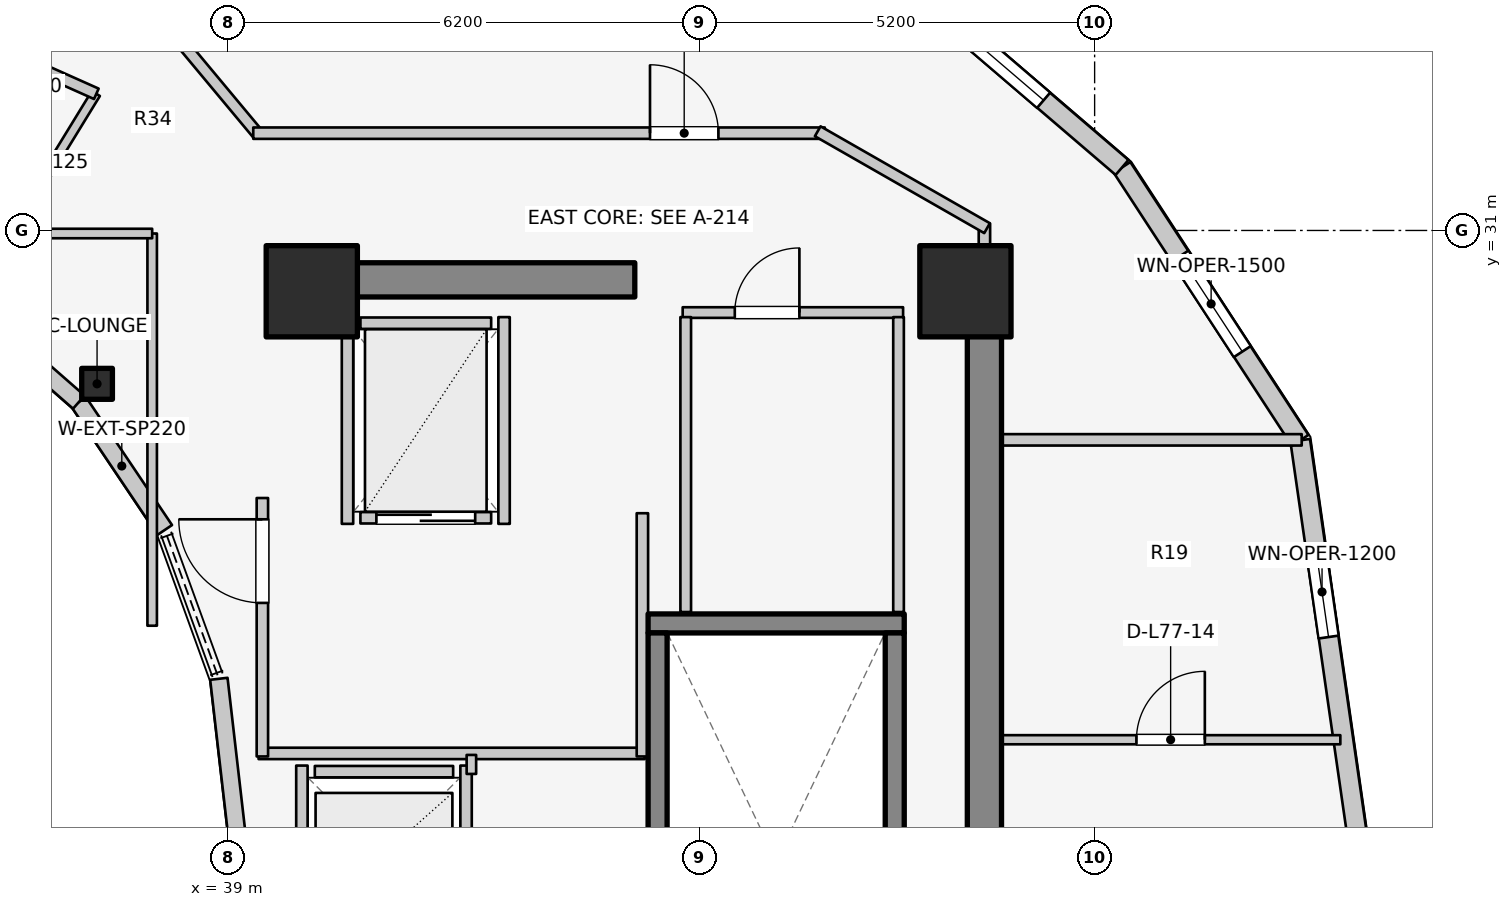
"""IFC4 building model, lengths in metres.
Left out: names, types, materials, properties, quantities, classifications, styles, units other than length and angle.
Written with IfcOpenShell. Run it as: python <this file> out.ifc"""

import sys

from ifc_helpers import new_model, si_unit, direction, frame, frame_2d, origin, origin_2d, place, context, subcontext, project, spatial, rectangle, i_section, extrude, element, fill, save


model = new_model("IFC4")
c1 = context("Model", 3, precision=1e-05, world=origin(), true_north=direction((0.0, 1.0)))
c2 = subcontext(c1, "Body", "Model", "MODEL_VIEW")
j1 = project(units=[si_unit("LENGTHUNIT", "METRE"), si_unit("PLANEANGLEUNIT", "RADIAN")], contexts=[c1])
p1 = place(None, origin())
s1 = spatial("IfcSite", under=j1, at=p1, CompositionType="ELEMENT")
p2 = place(p1, origin())
s2 = spatial("IfcBuilding", under=s1, at=p2, CompositionType="ELEMENT")
p3 = place(p2, frame((0.0, 0.0, 253.2)))
s3 = spatial("IfcBuildingStorey", under=s2, at=p3, CompositionType="ELEMENT", Elevation=253.2)
p4 = place(p3, frame((48.95, 17.05, 0.0), z_axis=(0.0, 0.0, 1.0), x_axis=(0.0, 1.0, 0.0)))
e1 = element("IfcWall", 1, at=p4, inside=s3, PredefinedType="SHEAR", context=c2, shape_type="SweptSolid", body=[
    extrude(rectangle(XDim=12.8, YDim=0.45, at=frame_2d((6.4, 0.0))), origin(), (0.0, 0.0, 1.0), 3.6),
])
p5 = place(p3, frame((39.85, 30.35, 0.0), z_axis=(0.0, 0.0, 1.0), x_axis=(1.0, 0.0, 0.0)))
e2 = element("IfcWall", 2, at=p5, inside=s3, PredefinedType="SHEAR", context=c2, shape_type="SweptSolid", body=[
    extrude(rectangle(XDim=4.5, YDim=0.45, at=frame_2d((2.25, 0.0))), origin(), (0.0, 0.0, 1.0), 3.6),
])
p6 = place(p3, frame((44.525, 25.83, 0.0), z_axis=(0.0, 0.0, 1.0), x_axis=(1.0, 0.0, 0.0)))
e3 = element("IfcWall", 3, at=p6, inside=s3, PredefinedType="SOLIDWALL", context=c2, shape_type="SweptSolid", body=[
    extrude(rectangle(XDim=3.37, YDim=0.25, at=frame_2d((1.685, 0.0))), origin(), (0.0, 0.0, 1.0), 3.6),
])
for number, where, z_axis, x_axis in (
    (4, (44.65, 17.895, 0.0), (0.0, 0.0, 1.0), (0.0, 1.0, 0.0)),
    (5, (47.77, 17.895, 0.0), (0.0, 0.0, 1.0), (0.0, 1.0, 0.0)),
):
    element("IfcWall", number, at=place(p3, frame(where, z_axis=z_axis, x_axis=x_axis)), inside=s3, PredefinedType="SOLIDWALL", context=c2, shape_type="SweptSolid", body=[
        extrude(rectangle(XDim=7.81, YDim=0.25, at=frame_2d((3.905, 0.0))), origin(), (0.0, 0.0, 1.0), 3.6),
    ])
for number, where, z_axis, x_axis in (
    (6, (48.7, 30.2, 0.0), (0.0, 0.0, 1.0), (1.0, 0.0, 0.0)),
    (7, (40.1, 30.2, 0.0), (0.0, 0.0, 1.0), (1.0, 0.0, 0.0)),
):
    element("IfcColumn", number, at=place(p3, frame(where, z_axis=z_axis, x_axis=x_axis)), inside=s3, PredefinedType="COLUMN", context=c2, shape_type="SweptSolid", body=[
        extrude(rectangle(XDim=1.2, YDim=1.2, at=origin_2d()), origin(), (0.0, 0.0, 1.0), 3.6),
    ])
p7 = place(p3, frame((37.275, 28.982, 0.0), z_axis=(0.0, 0.0, 1.0), x_axis=(1.0, 0.0, 0.0)))
e8 = element("IfcColumn", 8, at=p7, inside=s3, PredefinedType="COLUMN", context=c2, shape_type="SweptSolid", body=[
    extrude(i_section(OverallWidth=0.404, OverallDepth=0.407, WebThickness=0.027, FlangeThickness=0.044, FilletRadius=0.025, at=origin_2d()), origin(), (0.0, 0.0, 1.0), 3.6),
])
p8 = place(p3, frame((39.12, 23.0, 0.0), z_axis=(0.0, 0.0, 1.0), x_axis=(-0.114711713601, 0.993398823617, 0.0)))
e9 = element("IfcWall", 9, at=p8, inside=s3, PredefinedType="STANDARD", context=c2, shape_type="SweptSolid", body=[
    extrude(rectangle(XDim=2.115, YDim=0.23, at=frame_2d((1.058, 0.0))), origin(), (0.0, 0.0, 1.0), 3.28),
])
p9 = place(p3, frame((38.166, 27.06, 0.0), z_axis=(0.0, 0.0, 1.0), x_axis=(-0.558197800898, 0.829707909492, 0.0)))
e10 = element("IfcWall", 10, at=p9, inside=s3, PredefinedType="STANDARD", context=c2, shape_type="SweptSolid", body=[
    extrude(rectangle(XDim=2.027, YDim=0.23, at=frame_2d((1.013, 0.0))), origin(), (0.0, 0.0, 1.0), 2.6),
])
p10 = place(p3, frame((37.035, 28.742, 0.0), z_axis=(0.0, 0.0, 1.0), x_axis=(-0.752576694707, 0.658504607869, 0.0)))
e11 = element("IfcWall", 11, at=p10, inside=s3, PredefinedType="STANDARD", context=c2, shape_type="SweptSolid", body=[
    extrude(rectangle(XDim=1.959, YDim=0.23, at=frame_2d((0.98, 0.0))), origin(), (0.0, 0.0, 1.0), 2.6),
])
p11 = place(p3, frame((53.86, 23.0, 0.0), z_axis=(0.0, 0.0, 1.0), x_axis=(-0.142712754019, 0.989764148593, 0.0)))
e12 = element("IfcWall", 12, at=p11, inside=s3, PredefinedType="STANDARD", context=c2, shape_type="SweptSolid", body=[
    extrude(rectangle(XDim=5.293, YDim=0.26, at=frame_2d((2.646, 0.0))), origin(), (0.0, 0.0, 1.0), 3.29),
])
p12 = place(p11, frame((2.678, 0.0, 0.75)))
e13 = element("IfcOpeningElement", 13, at=p12, cuts=e12, PredefinedType="OPENING", context=c2, shape_type="SweptSolid", body=[
    extrude(rectangle(XDim=1.2, YDim=1.5, at=frame_2d((0.6, 0.75))), frame((0.0, 0.14, 0.0), z_axis=(0.0, -1.0, 0.0), x_axis=(1.0, 0.0, 0.0)), (0.0, 0.0, 1.0), 0.28),
])
p13 = place(p3, frame((53.105, 28.239, 0.0), z_axis=(0.0, 0.0, 1.0), x_axis=(-0.546606419826, 0.837389647539, 0.0)))
e14 = element("IfcWall", 14, at=p13, inside=s3, PredefinedType="STANDARD", context=c2, shape_type="SweptSolid", body=[
    extrude(rectangle(XDim=4.288, YDim=0.26, at=frame_2d((2.144, 0.0))), origin(), (0.0, 0.0, 1.0), 3.29),
])
p14 = place(p13, frame((1.394, 0.0, 0.75)))
e15 = element("IfcOpeningElement", 15, at=p14, cuts=e14, PredefinedType="OPENING", context=c2, shape_type="SweptSolid", body=[
    extrude(rectangle(XDim=1.5, YDim=1.6, at=frame_2d((0.75, 0.8))), frame((0.0, 0.14, 0.0), z_axis=(0.0, -1.0, 0.0), x_axis=(1.0, 0.0, 0.0)), (0.0, 0.0, 1.0), 0.28),
])
p15 = place(p3, frame((50.761, 31.829, 0.0), z_axis=(0.0, 0.0, 1.0), x_axis=(-0.759587504333, 0.650405122413, 0.0)))
e16 = element("IfcWall", 16, at=p15, inside=s3, PredefinedType="STANDARD", context=c2, shape_type="SweptSolid", body=[
    extrude(rectangle(XDim=4.217, YDim=0.26, at=frame_2d((2.109, 0.0))), origin(), (0.0, 0.0, 1.0), 3.29),
])
p16 = place(p15, frame((1.359, 0.0, 0.75)))
e17 = element("IfcOpeningElement", 17, at=p16, cuts=e16, PredefinedType="OPENING", context=c2, shape_type="SweptSolid", body=[
    extrude(rectangle(XDim=1.5, YDim=1.6, at=frame_2d((0.75, 0.8))), frame((0.0, 0.14, 0.0), z_axis=(0.0, -1.0, 0.0), x_axis=(1.0, 0.0, 0.0)), (0.0, 0.0, 1.0), 0.28),
])
p17 = place(p3, frame((40.14, 23.88, 0.0), z_axis=(0.0, 0.0, 1.0), x_axis=(1.0, 0.0, 0.0)))
e18 = element("IfcWall", 18, at=p17, inside=s3, PredefinedType="SOLIDWALL", context=c2, shape_type="SweptSolid", body=[
    extrude(rectangle(XDim=1.82, YDim=0.15, at=frame_2d((0.91, 0.0))), origin(), (0.0, 0.0, 1.0), 2.62),
])
p18 = place(p3, frame((39.97, 21.64, 0.0), z_axis=(0.0, 0.0, 1.0), x_axis=(0.0, 1.0, 0.0)))
e19 = element("IfcWall", 19, at=p18, inside=s3, PredefinedType="SOLIDWALL", context=c2, shape_type="SweptSolid", body=[
    extrude(rectangle(XDim=2.32, YDim=0.15, at=frame_2d((1.16, 0.0))), origin(), (0.0, 0.0, 1.0), 2.62),
])
p19 = place(p3, frame((42.13, 21.64, 0.0), z_axis=(0.0, 0.0, 1.0), x_axis=(0.0, 1.0, 0.0)))
e20 = element("IfcWall", 20, at=p19, inside=s3, PredefinedType="SOLIDWALL", context=c2, shape_type="SweptSolid", body=[
    extrude(rectangle(XDim=2.32, YDim=0.15, at=frame_2d((1.16, 0.0))), origin(), (0.0, 0.0, 1.0), 3.295),
])
p20 = place(p3, frame((40.74, 27.22, 0.0), z_axis=(0.0, 0.0, 1.0), x_axis=(1.0, 0.0, 0.0)))
e21 = element("IfcWall", 21, at=p20, inside=s3, PredefinedType="SOLIDWALL", context=c2, shape_type="SweptSolid", body=[
    extrude(rectangle(XDim=1.72, YDim=0.15, at=frame_2d((0.86, 0.0))), origin(), (0.0, 0.0, 1.0), 3.295),
])
p21 = place(p20, frame((0.21, 0.0, 0.0)))
e22 = element("IfcOpeningElement", 22, at=p21, cuts=e21, PredefinedType="OPENING", context=c2, shape_type="SweptSolid", body=[
    extrude(rectangle(XDim=1.3, YDim=2.1, at=frame_2d((0.65, 1.05))), frame((0.0, 0.085, 0.0), z_axis=(0.0, -1.0, 0.0), x_axis=(1.0, 0.0, 0.0)), (0.0, 0.0, 1.0), 0.17),
])
p22 = place(p3, frame((40.74, 29.78, 0.0), z_axis=(0.0, 0.0, 1.0), x_axis=(1.0, 0.0, 0.0)))
e23 = element("IfcWall", 23, at=p22, inside=s3, PredefinedType="SOLIDWALL", context=c2, shape_type="SweptSolid", body=[
    extrude(rectangle(XDim=1.72, YDim=0.15, at=frame_2d((0.86, 0.0))), origin(), (0.0, 0.0, 1.0), 3.295),
])
for number, where, z_axis, x_axis in (
    (24, (40.57, 27.14, 0.0), (0.0, 0.0, 1.0), (0.0, 1.0, 0.0)),
    (25, (42.63, 27.14, 0.0), (0.0, 0.0, 1.0), (0.0, 1.0, 0.0)),
):
    element("IfcWall", number, at=place(p3, frame(where, z_axis=z_axis, x_axis=x_axis)), inside=s3, PredefinedType="SOLIDWALL", context=c2, shape_type="SweptSolid", body=[
        extrude(rectangle(XDim=2.72, YDim=0.15, at=frame_2d((1.36, 0.0))), origin(), (0.0, 0.0, 1.0), 3.295),
    ])
p23 = place(p3, frame((39.4, 24.12, 0.0), z_axis=(0.0, 0.0, 1.0), x_axis=(1.0, 0.0, 0.0)))
e26 = element("IfcWall", 26, at=p23, inside=s3, PredefinedType="PARTITIONING", context=c2, shape_type="SweptSolid", body=[
    extrude(rectangle(XDim=5.08, YDim=0.15, at=frame_2d((2.54, 0.0))), origin(), (0.0, 0.0, 1.0), 2.62),
])
p24 = place(p3, frame((44.45, 24.08, 0.0), z_axis=(0.0, 0.0, 1.0), x_axis=(0.0, 1.0, 0.0)))
e27 = element("IfcWall", 27, at=p24, inside=s3, PredefinedType="PARTITIONING", context=c2, shape_type="SweptSolid", body=[
    extrude(rectangle(XDim=3.2, YDim=0.15, at=frame_2d((1.6, 0.0))), origin(), (0.0, 0.0, 1.0), 3.295),
])
p25 = place(p3, frame((39.45, 24.08, 0.0), z_axis=(0.0, 0.0, 1.0), x_axis=(0.0, 1.0, 0.0)))
e28 = element("IfcWall", 28, at=p25, inside=s3, PredefinedType="PARTITIONING", context=c2, shape_type="SweptSolid", body=[
    extrude(rectangle(XDim=3.4, YDim=0.15, at=frame_2d((1.7, 0.0))), origin(), (0.0, 0.0, 1.0), 3.295),
])
p26 = place(p25, frame((2.02, 0.0, 0.0)))
e29 = element("IfcOpeningElement", 29, at=p26, cuts=e28, PredefinedType="OPENING", context=c2, shape_type="SweptSolid", body=[
    extrude(rectangle(XDim=1.1, YDim=2.1, at=frame_2d((0.55, 1.05))), frame((0.0, 0.085, 0.0), z_axis=(0.0, -1.0, 0.0), x_axis=(1.0, 0.0, 0.0)), (0.0, 0.0, 1.0), 0.17),
])
p27 = place(p3, frame((42.2, 23.85, 0.0), z_axis=(0.0, 0.0, 1.0), x_axis=(0.0, 1.0, 0.0)))
e30 = element("IfcWall", 30, at=p27, inside=s3, PredefinedType="PARTITIONING", context=c2, shape_type="SweptSolid", body=[
    extrude(rectangle(XDim=0.25, YDim=0.125, at=frame_2d((0.125, 0.0))), origin(), (0.0, 0.0, 1.0), 3.295),
])
p28 = place(p3, frame((44.98, 29.92, 0.0), z_axis=(0.0, 0.0, 1.0), x_axis=(1.0, 0.0, 0.0)))
e31 = element("IfcWall", 31, at=p28, inside=s3, PredefinedType="PLUMBINGWALL", context=c2, shape_type="SweptSolid", body=[
    extrude(rectangle(XDim=2.9, YDim=0.14, at=frame_2d((1.45, 0.0))), origin(), (0.0, 0.0, 1.0), 3.295),
])
p29 = place(p28, frame((0.686, 0.0, 0.0)))
e32 = element("IfcOpeningElement", 32, at=p29, cuts=e31, PredefinedType="OPENING", context=c2, shape_type="SweptSolid", body=[
    extrude(rectangle(XDim=0.85, YDim=2.05, at=frame_2d((0.425, 1.025))), frame((0.0, 0.08, 0.0), z_axis=(0.0, -1.0, 0.0), x_axis=(1.0, 0.0, 0.0)), (0.0, 0.0, 1.0), 0.16),
])
for number, where, z_axis, x_axis in (
    (33, (45.02, 25.98, 0.0), (0.0, 0.0, 1.0), (0.0, 1.0, 0.0)),
    (34, (47.82, 25.98, 0.0), (0.0, 0.0, 1.0), (0.0, 1.0, 0.0)),
):
    element("IfcWall", number, at=place(p3, frame(where, z_axis=z_axis, x_axis=x_axis)), inside=s3, PredefinedType="PLUMBINGWALL", context=c2, shape_type="SweptSolid", body=[
        extrude(rectangle(XDim=3.88, YDim=0.14, at=frame_2d((1.94, 0.0))), origin(), (0.0, 0.0, 1.0), 3.295),
    ])
p30 = place(p3, frame((35.55, 30.015, 0.0), z_axis=(0.0, 0.0, 1.0), x_axis=(0.522763432117, 0.852477796802, 0.0)))
e35 = element("IfcWall", 35, at=p30, inside=s3, PredefinedType="PARTITIONING", context=c2, shape_type="SweptSolid", body=[
    extrude(rectangle(XDim=3.269, YDim=0.125, at=frame_2d((1.635, 0.0))), origin(), (0.0, 0.0, 1.0), 2.672),
])
p31 = place(p3, frame((37.265, 32.798, 0.0), z_axis=(0.0, 0.0, 1.0), x_axis=(-0.913254317828, 0.407389924971, 0.0)))
e36 = element("IfcWall", 36, at=p31, inside=s3, PredefinedType="PARTITIONING", context=c2, shape_type="SweptSolid", body=[
    extrude(rectangle(XDim=2.787, YDim=0.15, at=frame_2d((1.393, 0.0))), origin(), (0.0, 0.0, 1.0), 2.823),
])
p32 = place(p3, frame((38.0, 25.8, 0.0), z_axis=(0.0, 0.0, 1.0), x_axis=(0.0, 1.0, 0.0)))
e37 = element("IfcWall", 37, at=p32, inside=s3, PredefinedType="PARTITIONING", context=c2, shape_type="SweptSolid", body=[
    extrude(rectangle(XDim=5.16, YDim=0.125, at=frame_2d((2.58, 0.0))), origin(), (0.0, 0.0, 1.0), 2.672),
])
p33 = place(p3, frame((35.4, 30.96, 0.0), z_axis=(0.0, 0.0, 1.0), x_axis=(1.0, 0.0, 0.0)))
e38 = element("IfcWall", 38, at=p33, inside=s3, PredefinedType="PARTITIONING", context=c2, shape_type="SweptSolid", body=[
    extrude(rectangle(XDim=2.6, YDim=0.125, at=frame_2d((1.3, 0.0))), origin(), (0.0, 0.0, 1.0), 2.816),
])
p34 = place(p3, frame((48.95, 28.245, 0.0), z_axis=(0.0, 0.0, 1.0), x_axis=(1.0, 0.0, 0.0)))
e39 = element("IfcWall", 39, at=p34, inside=s3, PredefinedType="PARTITIONING", context=c2, shape_type="SweptSolid", body=[
    extrude(rectangle(XDim=4.175, YDim=0.15, at=frame_2d((2.087, 0.0))), origin(), (0.0, 0.0, 1.0), 3.295),
])
p35 = place(p3, frame((48.95, 24.3, 0.0), z_axis=(0.0, 0.0, 1.0), x_axis=(1.0, 0.0, 0.0)))
e40 = element("IfcWall", 40, at=p35, inside=s3, PredefinedType="MOVABLE", context=c2, shape_type="SweptSolid", body=[
    extrude(rectangle(XDim=4.683, YDim=0.12, at=frame_2d((2.341, 0.0))), origin(), (0.0, 0.0, 1.0), 3.295),
])
p36 = place(p35, frame((2.0, 0.0, 0.0)))
e41 = element("IfcOpeningElement", 41, at=p36, cuts=e40, PredefinedType="OPENING", context=c2, shape_type="SweptSolid", body=[
    extrude(rectangle(XDim=0.9, YDim=2.1, at=frame_2d((0.45, 1.05))), frame((0.0, 0.07, 0.0), z_axis=(0.0, -1.0, 0.0), x_axis=(1.0, 0.0, 0.0)), (0.0, 0.0, 1.0), 0.14),
])
p37 = place(p3, frame((48.95, 29.8, 0.0), z_axis=(0.0, 0.0, 1.0), x_axis=(0.0, 1.0, 0.0)))
e42 = element("IfcWall", 42, at=p37, inside=s3, PredefinedType="PARTITIONING", context=c2, shape_type="SweptSolid", body=[
    extrude(rectangle(XDim=1.29, YDim=0.15, at=frame_2d((0.645, 0.0))), origin(), (0.0, 0.0, 1.0), 3.295),
])
p38 = place(p3, frame((37.984, 33.955, 0.0), z_axis=(0.0, 0.0, 1.0), x_axis=(0.64030392053, -0.76812166312, 0.0)))
e43 = element("IfcWall", 43, at=p38, inside=s3, PredefinedType="PARTITIONING", context=c2, shape_type="SweptSolid", body=[
    extrude(rectangle(XDim=2.21, YDim=0.15, at=frame_2d((1.105, 0.0))), origin(), (0.0, 0.0, 1.0), 2.816),
])
p39 = place(p3, frame((39.33, 32.28, 0.0), z_axis=(0.0, 0.0, 1.0), x_axis=(1.0, 0.0, 0.0)))
e44 = element("IfcWall", 44, at=p39, inside=s3, PredefinedType="PARTITIONING", context=c2, shape_type="SweptSolid", body=[
    extrude(rectangle(XDim=7.52, YDim=0.15, at=frame_2d((3.76, 0.0))), origin(), (0.0, 0.0, 1.0), 2.816),
])
p40 = place(p39, frame((5.22, 0.0, 0.0)))
e45 = element("IfcOpeningElement", 45, at=p40, cuts=e44, PredefinedType="OPENING", context=c2, shape_type="SweptSolid", body=[
    extrude(rectangle(XDim=0.9, YDim=2.1, at=frame_2d((0.45, 1.05))), frame((0.0, 0.085, 0.0), z_axis=(0.0, -1.0, 0.0), x_axis=(1.0, 0.0, 0.0)), (0.0, 0.0, 1.0), 0.17),
])
p41 = place(p3, frame((46.757, 32.305, 0.0), z_axis=(0.0, 0.0, 1.0), x_axis=(0.867991349648, -0.496579315857, 0.0)))
e46 = element("IfcWall", 46, at=p41, inside=s3, PredefinedType="PARTITIONING", context=c2, shape_type="SweptSolid", body=[
    extrude(rectangle(XDim=2.567, YDim=0.15, at=frame_2d((1.283, 0.0))), origin(), (0.0, 0.0, 1.0), 2.66),
])
p42 = place(p12, origin())
e47 = element("IfcWindow", 47, at=p42, inside=s3, PartitioningType="SINGLE_PANEL", PredefinedType="WINDOW", context=c2, shape_type="SweptSolid", body=[
    extrude(rectangle(XDim=1.2, YDim=1.5, at=frame_2d((0.6, 0.75))), frame((0.0, 0.03, 0.0), z_axis=(0.0, -1.0, 0.0), x_axis=(1.0, 0.0, 0.0)), (0.0, 0.0, 1.0), 0.06),
])
fill(e13, e47)
p43 = place(p14, origin())
e48 = element("IfcWindow", 48, at=p43, inside=s3, PartitioningType="SINGLE_PANEL", PredefinedType="WINDOW", context=c2, shape_type="SweptSolid", body=[
    extrude(rectangle(XDim=1.5, YDim=1.6, at=frame_2d((0.75, 0.8))), frame((0.0, 0.03, 0.0), z_axis=(0.0, -1.0, 0.0), x_axis=(1.0, 0.0, 0.0)), (0.0, 0.0, 1.0), 0.06),
])
fill(e15, e48)
p44 = place(p16, origin())
e49 = element("IfcWindow", 49, at=p44, inside=s3, PartitioningType="SINGLE_PANEL", PredefinedType="WINDOW", context=c2, shape_type="SweptSolid", body=[
    extrude(rectangle(XDim=1.5, YDim=1.6, at=frame_2d((0.75, 0.8))), frame((0.0, 0.03, 0.0), z_axis=(0.0, -1.0, 0.0), x_axis=(1.0, 0.0, 0.0)), (0.0, 0.0, 1.0), 0.06),
])
fill(e17, e49)
p45 = place(p21, origin())
e50 = element("IfcDoor", 50, at=p45, inside=s3, OperationType="DOUBLE_DOOR_SLIDING", PredefinedType="DOOR", context=c2, shape_type="SweptSolid", body=[
    extrude(rectangle(XDim=1.3, YDim=2.1, at=frame_2d((0.65, 1.05))), frame((0.0, 0.025, 0.0), z_axis=(0.0, -1.0, 0.0), x_axis=(1.0, 0.0, 0.0)), (0.0, 0.0, 1.0), 0.05),
])
fill(e22, e50)
p46 = place(p26, origin())
e51 = element("IfcDoor", 51, at=p46, inside=s3, OperationType="SINGLE_SWING_RIGHT", PredefinedType="DOOR", context=c2, shape_type="SweptSolid", body=[
    extrude(rectangle(XDim=1.1, YDim=2.1, at=frame_2d((0.55, 1.05))), frame((0.0, 0.025, 0.0), z_axis=(0.0, -1.0, 0.0), x_axis=(1.0, 0.0, 0.0)), (0.0, 0.0, 1.0), 0.05),
])
fill(e29, e51)
p47 = place(p29, origin())
e52 = element("IfcDoor", 52, at=p47, inside=s3, OperationType="SINGLE_SWING_RIGHT", PredefinedType="DOOR", context=c2, shape_type="SweptSolid", body=[
    extrude(rectangle(XDim=0.85, YDim=2.05, at=frame_2d((0.425, 1.025))), frame((0.0, 0.025, 0.0), z_axis=(0.0, -1.0, 0.0), x_axis=(1.0, 0.0, 0.0)), (0.0, 0.0, 1.0), 0.05),
])
fill(e32, e52)
p48 = place(p36, origin())
e53 = element("IfcDoor", 53, at=p48, inside=s3, OperationType="SINGLE_SWING_RIGHT", PredefinedType="DOOR", context=c2, shape_type="SweptSolid", body=[
    extrude(rectangle(XDim=0.9, YDim=2.1, at=frame_2d((0.45, 1.05))), frame((0.0, 0.025, 0.0), z_axis=(0.0, -1.0, 0.0), x_axis=(1.0, 0.0, 0.0)), (0.0, 0.0, 1.0), 0.05),
])
fill(e41, e53)
p49 = place(p40, origin())
e54 = element("IfcDoor", 54, at=p49, inside=s3, OperationType="SINGLE_SWING_LEFT", PredefinedType="DOOR", context=c2, shape_type="SweptSolid", body=[
    extrude(rectangle(XDim=0.9, YDim=2.1, at=frame_2d((0.45, 1.05))), frame((0.0, 0.025, 0.0), z_axis=(0.0, -1.0, 0.0), x_axis=(1.0, 0.0, 0.0)), (0.0, 0.0, 1.0), 0.05),
])
fill(e45, e54)
save(model, sys.argv[1])
